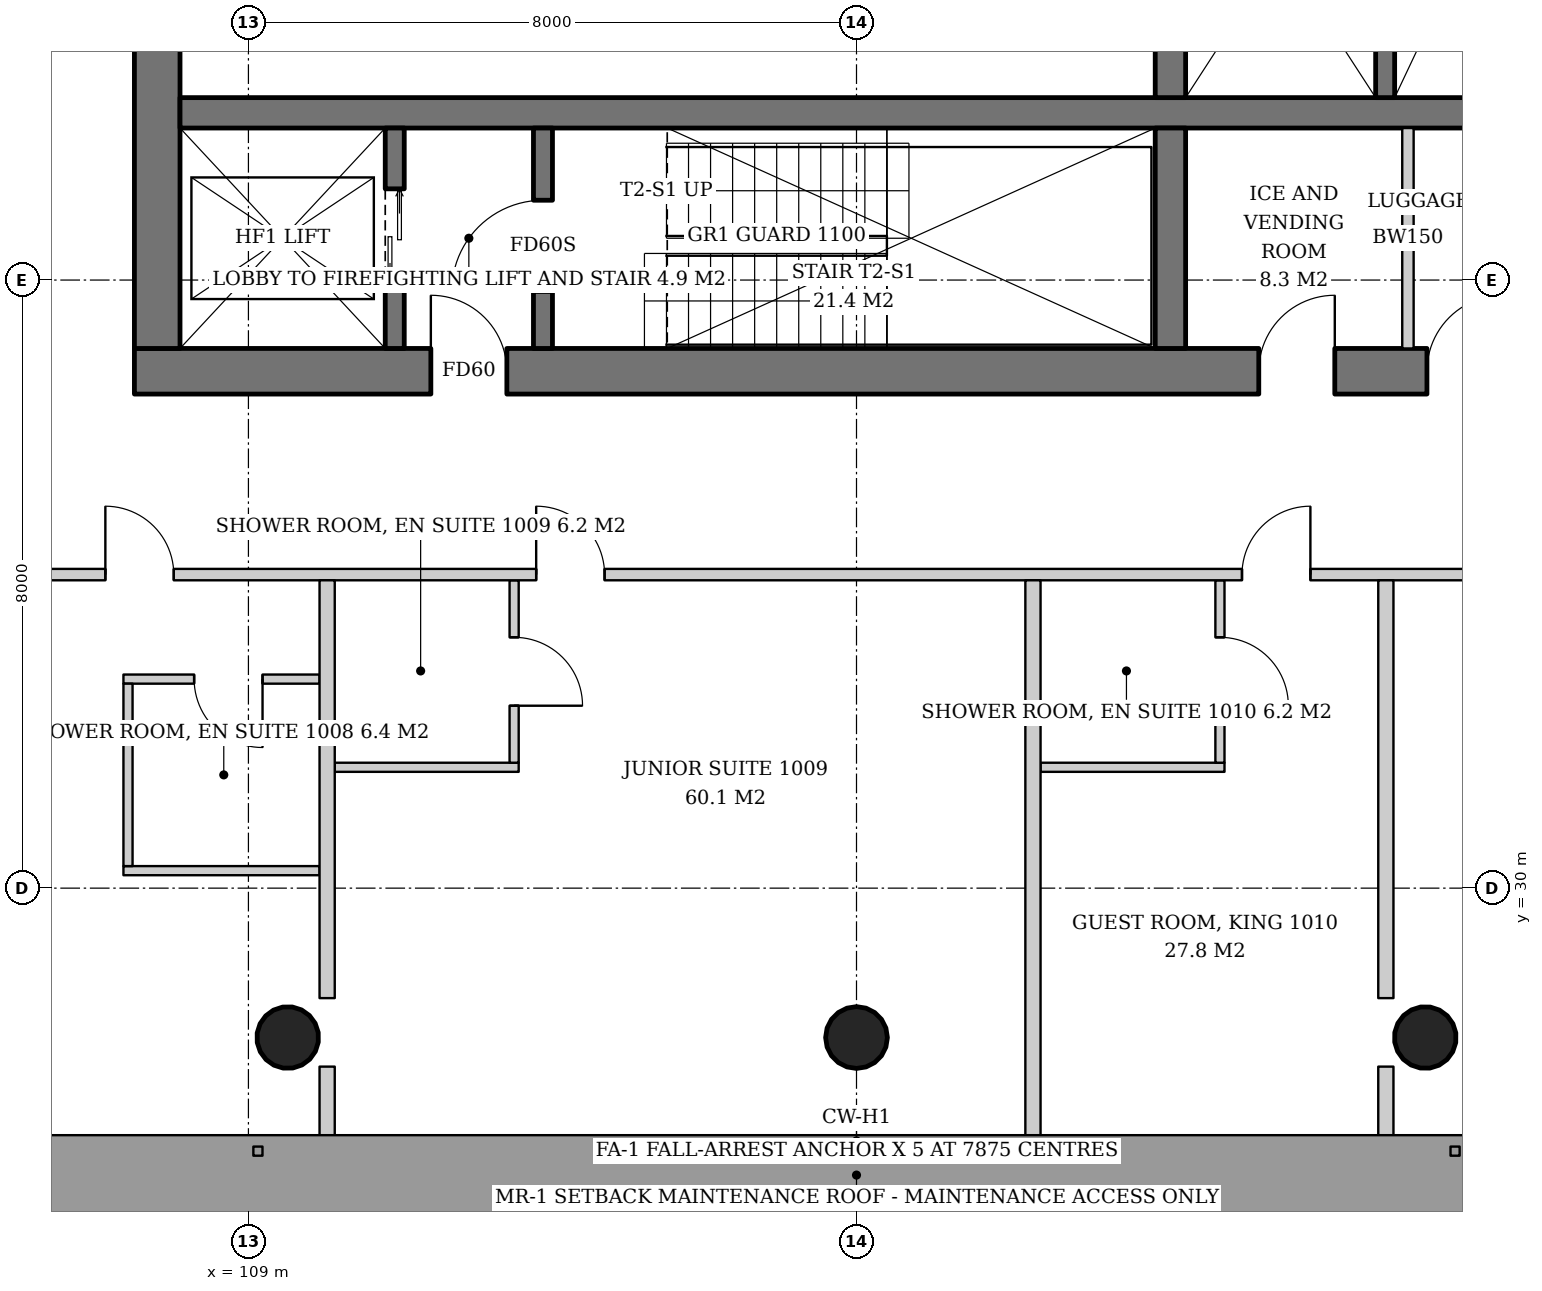
"""IFC4 building model, lengths in metres.
Left out: names, types, materials, properties, quantities, classifications, styles, units other than length and angle.
Written with IfcOpenShell. Run it as: python <this file> out.ifc"""

import sys

from ifc_helpers import new_model, si_unit, direction, frame, frame_2d, origin, origin_2d, place, context, subcontext, project, spatial, rectangle, hollow_circle, extrude, element, fill, save


model = new_model("IFC4")
c1 = context("Model", 3, precision=1e-05, world=origin(), true_north=direction((0.0, 1.0)))
c2 = subcontext(c1, "Body", "Model", "MODEL_VIEW")
j1 = project(units=[si_unit("LENGTHUNIT", "METRE"), si_unit("PLANEANGLEUNIT", "RADIAN")], contexts=[c1])
p1 = place(None, origin())
s1 = spatial("IfcSite", under=j1, at=p1, CompositionType="ELEMENT")
p2 = place(p1, origin())
s2 = spatial("IfcBuilding", under=s1, at=p2, CompositionType="ELEMENT")
p3 = place(p2, frame((0.0, 0.0, 43.8)))
s3 = spatial("IfcBuildingStorey", under=s2, at=p3, CompositionType="ELEMENT", Elevation=43.8)
p4 = place(p3, frame((109.491, 27.983, 0.0), z_axis=(0.021497706284, 0.043059584825, 0.998841188968), x_axis=(-0.894693706707, 0.446680166538, 0.0)))
e1 = element("IfcColumn", 1, at=p4, inside=s3, PredefinedType="COLUMN", context=c2, shape_type="SweptSolid", body=[
    extrude(hollow_circle(Radius=0.406, WallThickness=0.03, at=origin_2d()), origin(), (0.0, 0.0, 1.0), 3.804),
])
p5 = place(p3, frame((117.0, 27.983, 0.0), z_axis=(0.0, 0.043069538298, 0.999072076915), x_axis=(-1.0, 0.0, 0.0)))
e2 = element("IfcColumn", 2, at=p5, inside=s3, PredefinedType="COLUMN", context=c2, shape_type="SweptSolid", body=[
    extrude(hollow_circle(Radius=0.406, WallThickness=0.03, at=origin_2d()), origin(), (0.0, 0.0, 1.0), 3.803),
])
p6 = place(p3, frame((124.509, 27.983, 0.0), z_axis=(-0.021497706284, 0.043059584825, 0.998841188968), x_axis=(-0.894693706707, -0.446680166538, 0.0)))
e3 = element("IfcColumn", 3, at=p6, inside=s3, PredefinedType="COLUMN", context=c2, shape_type="SweptSolid", body=[
    extrude(hollow_circle(Radius=0.406, WallThickness=0.03, at=origin_2d()), origin(), (0.0, 0.0, 1.0), 3.804),
])
p7 = place(p3, frame((107.5, 36.8, 0.0), z_axis=(0.0, 0.0, 1.0), x_axis=(1.0, 0.0, 0.0)))
e4 = element("IfcWall", 4, at=p7, inside=s3, PredefinedType="SHEAR", context=c2, shape_type="SweptSolid", body=[
    extrude(rectangle(XDim=19.0, YDim=0.6, at=frame_2d((9.5, 0.0))), origin(), (0.0, 0.0, 1.0), 3.8),
])
p8 = place(p7, frame((3.9, 0.0, 0.0)))
e5 = element("IfcOpeningElement", 5, at=p8, cuts=e4, PredefinedType="OPENING", context=c2, shape_type="SweptSolid", body=[
    extrude(rectangle(XDim=1.0, YDim=2.1, at=frame_2d((0.5, 1.05))), frame((0.0, 0.31, 0.0), z_axis=(0.0, -1.0, 0.0), x_axis=(1.0, 0.0, 0.0)), (0.0, 0.0, 1.0), 0.62),
])
p9 = place(p7, frame((14.792, 0.0, 0.0)))
e6 = element("IfcOpeningElement", 6, at=p9, cuts=e4, PredefinedType="OPENING", context=c2, shape_type="SweptSolid", body=[
    extrude(rectangle(XDim=1.0, YDim=2.1, at=frame_2d((0.5, 1.05))), frame((0.0, 0.31, 0.0), z_axis=(0.0, -1.0, 0.0), x_axis=(1.0, 0.0, 0.0)), (0.0, 0.0, 1.0), 0.62),
])
p10 = place(p7, frame((17.005, 0.0, 0.0)))
e7 = element("IfcOpeningElement", 7, at=p10, cuts=e4, PredefinedType="OPENING", context=c2, shape_type="SweptSolid", body=[
    extrude(rectangle(XDim=1.0, YDim=2.1, at=frame_2d((0.5, 1.05))), frame((0.0, 0.31, 0.0), z_axis=(0.0, -1.0, 0.0), x_axis=(1.0, 0.0, 0.0)), (0.0, 0.0, 1.0), 0.62),
])
p11 = place(p3, frame((107.8, 37.1, 0.0), z_axis=(0.0, 0.0, 1.0), x_axis=(0.0, 1.0, 0.0)))
e8 = element("IfcWall", 8, at=p11, inside=s3, PredefinedType="SHEAR", context=c2, shape_type="SweptSolid", body=[
    extrude(rectangle(XDim=17.8, YDim=0.6, at=frame_2d((8.9, 0.0))), origin(), (0.0, 0.0, 1.0), 3.8),
])
p12 = place(p11, frame((8.0, 0.0, 0.0)))
e9 = element("IfcOpeningElement", 9, at=p12, cuts=e8, PredefinedType="OPENING", context=c2, shape_type="SweptSolid", body=[
    extrude(rectangle(XDim=1.8, YDim=2.4, at=frame_2d((0.9, 1.2))), frame((0.0, 0.31, 0.0), z_axis=(0.0, -1.0, 0.0), x_axis=(1.0, 0.0, 0.0)), (0.0, 0.0, 1.0), 0.62),
])
p13 = place(p3, frame((108.1, 40.2, 0.0), z_axis=(0.0, 0.0, 1.0), x_axis=(1.0, 0.0, 0.0)))
e10 = element("IfcWall", 10, at=p13, inside=s3, PredefinedType="SHEAR", context=c2, shape_type="SweptSolid", body=[
    extrude(rectangle(XDim=17.8, YDim=0.4, at=frame_2d((8.9, 0.0))), origin(), (0.0, 0.0, 1.0), 3.8),
])
p14 = place(p3, frame((121.13, 37.1, 0.0), z_axis=(0.0, 0.0, 1.0), x_axis=(0.0, 1.0, 0.0)))
e11 = element("IfcWall", 11, at=p14, inside=s3, PredefinedType="SHEAR", context=c2, shape_type="SweptSolid", body=[
    extrude(rectangle(XDim=2.9, YDim=0.4, at=frame_2d((1.45, 0.0))), origin(), (0.0, 0.0, 1.0), 3.8),
])
p15 = place(p3, frame((121.13, 40.4, 0.0), z_axis=(0.0, 0.0, 1.0), x_axis=(0.0, 1.0, 0.0)))
e12 = element("IfcWall", 12, at=p15, inside=s3, PredefinedType="SHEAR", context=c2, shape_type="SweptSolid", body=[
    extrude(rectangle(XDim=11.2, YDim=0.4, at=frame_2d((5.6, 0.0))), origin(), (0.0, 0.0, 1.0), 3.8),
])
p16 = place(p3, frame((110.925, 37.1, 0.0), z_axis=(0.0, 0.0, 1.0), x_axis=(0.0, 1.0, 0.0)))
e13 = element("IfcWall", 13, at=p16, inside=s3, PredefinedType="SHEAR", context=c2, shape_type="SweptSolid", body=[
    extrude(rectangle(XDim=2.9, YDim=0.25, at=frame_2d((1.45, 0.0))), origin(), (0.0, 0.0, 1.0), 3.8),
])
p17 = place(p16, frame((0.8, 0.0, 0.0)))
e14 = element("IfcOpeningElement", 14, at=p17, cuts=e13, PredefinedType="OPENING", context=c2, shape_type="SweptSolid", body=[
    extrude(rectangle(XDim=1.3, YDim=2.2, at=frame_2d((0.65, 1.1))), frame((0.0, 0.135, 0.0), z_axis=(0.0, -1.0, 0.0), x_axis=(1.0, 0.0, 0.0)), (0.0, 0.0, 1.0), 0.27),
])
p18 = place(p3, frame((112.875, 37.1, 0.0), z_axis=(0.0, 0.0, 1.0), x_axis=(0.0, 1.0, 0.0)))
e15 = element("IfcWall", 15, at=p18, inside=s3, PredefinedType="SHEAR", context=c2, shape_type="SweptSolid", body=[
    extrude(rectangle(XDim=2.9, YDim=0.25, at=frame_2d((1.45, 0.0))), origin(), (0.0, 0.0, 1.0), 3.8),
])
p19 = place(p18, frame((0.75, 0.0, 0.0)))
e16 = element("IfcOpeningElement", 16, at=p19, cuts=e15, PredefinedType="OPENING", context=c2, shape_type="SweptSolid", body=[
    extrude(rectangle(XDim=1.2, YDim=2.1, at=frame_2d((0.6, 1.05))), frame((0.0, 0.135, 0.0), z_axis=(0.0, -1.0, 0.0), x_axis=(1.0, 0.0, 0.0)), (0.0, 0.0, 1.0), 0.27),
])
p20 = place(p3, frame((123.955, 44.25, 0.0), z_axis=(0.0, 0.0, 1.0), x_axis=(0.0, -1.0, 0.0)))
e17 = element("IfcWall", 17, at=p20, inside=s3, PredefinedType="SHEAR", context=c2, shape_type="SweptSolid", body=[
    extrude(rectangle(XDim=3.85, YDim=0.25, at=frame_2d((1.925, 0.0))), origin(), (0.0, 0.0, 1.0), 3.8),
])
p21 = place(p3, frame((124.255, 37.1, 0.0), z_axis=(0.0, 0.0, 1.0), x_axis=(0.0, 1.0, 0.0)))
e18 = element("IfcWall", 18, at=p21, inside=s3, PredefinedType="SOLIDWALL", context=c2, shape_type="SweptSolid", body=[
    extrude(rectangle(XDim=2.9, YDim=0.15, at=frame_2d((1.45, 0.0))), origin(), (0.0, 0.0, 1.0), 3.6),
])
p22 = place(p3, frame((109.936, 32.75, 0.0), z_axis=(0.0, 0.0, 1.0), x_axis=(-1.0, 0.0, 0.0)))
e19 = element("IfcWall", 19, at=p22, inside=s3, PredefinedType="PARTITIONING", context=c2, shape_type="SweptSolid", body=[
    extrude(rectangle(XDim=2.58, YDim=0.12, at=frame_2d((1.29, 0.0))), origin(), (0.0, 0.0, 1.0), 2.8),
])
p23 = place(p22, frame((0.75, 0.0, 0.0)))
e20 = element("IfcOpeningElement", 20, at=p23, cuts=e19, PredefinedType="OPENING", context=c2, shape_type="SweptSolid", body=[
    extrude(rectangle(XDim=0.9, YDim=2.1, at=frame_2d((0.45, 1.05))), frame((0.0, 0.07, 0.0), z_axis=(0.0, -1.0, 0.0), x_axis=(1.0, 0.0, 0.0)), (0.0, 0.0, 1.0), 0.14),
])
p24 = place(p3, frame((109.936, 30.23, 0.0), z_axis=(0.0, 0.0, 1.0), x_axis=(-1.0, 0.0, 0.0)))
e21 = element("IfcWall", 21, at=p24, inside=s3, PredefinedType="PARTITIONING", context=c2, shape_type="SweptSolid", body=[
    extrude(rectangle(XDim=2.58, YDim=0.12, at=frame_2d((1.29, 0.0))), origin(), (0.0, 0.0, 1.0), 2.8),
])
p25 = place(p3, frame((107.416, 32.69, 0.0), z_axis=(0.0, 0.0, 1.0), x_axis=(0.0, -1.0, 0.0)))
e22 = element("IfcWall", 22, at=p25, inside=s3, PredefinedType="PARTITIONING", context=c2, shape_type="SweptSolid", body=[
    extrude(rectangle(XDim=2.4, YDim=0.12, at=frame_2d((1.2, 0.0))), origin(), (0.0, 0.0, 1.0), 2.847),
])
p26 = place(p3, frame((110.136, 31.59, 0.0), z_axis=(0.0, 0.0, 1.0), x_axis=(1.0, 0.0, 0.0)))
e23 = element("IfcWall", 23, at=p26, inside=s3, PredefinedType="PARTITIONING", context=c2, shape_type="SweptSolid", body=[
    extrude(rectangle(XDim=2.42, YDim=0.12, at=frame_2d((1.21, 0.0))), origin(), (0.0, 0.0, 1.0), 2.847),
])
p27 = place(p3, frame((112.496, 34.05, 0.0), z_axis=(0.0, 0.0, 1.0), x_axis=(0.0, -1.0, 0.0)))
e24 = element("IfcWall", 24, at=p27, inside=s3, PredefinedType="PARTITIONING", context=c2, shape_type="SweptSolid", body=[
    extrude(rectangle(XDim=2.4, YDim=0.12, at=frame_2d((1.2, 0.0))), origin(), (0.0, 0.0, 1.0), 2.847),
])
p28 = place(p27, frame((0.75, 0.0, 0.0)))
e25 = element("IfcOpeningElement", 25, at=p28, cuts=e24, PredefinedType="OPENING", context=c2, shape_type="SweptSolid", body=[
    extrude(rectangle(XDim=0.9, YDim=2.1, at=frame_2d((0.45, 1.05))), frame((0.0, 0.07, 0.0), z_axis=(0.0, -1.0, 0.0), x_axis=(1.0, 0.0, 0.0)), (0.0, 0.0, 1.0), 0.14),
])
p29 = place(p3, frame((119.421, 31.59, 0.0), z_axis=(0.0, 0.0, 1.0), x_axis=(1.0, 0.0, 0.0)))
e26 = element("IfcWall", 26, at=p29, inside=s3, PredefinedType="PARTITIONING", context=c2, shape_type="SweptSolid", body=[
    extrude(rectangle(XDim=2.42, YDim=0.12, at=frame_2d((1.21, 0.0))), origin(), (0.0, 0.0, 1.0), 2.847),
])
p30 = place(p3, frame((121.781, 34.05, 0.0), z_axis=(0.0, 0.0, 1.0), x_axis=(0.0, -1.0, 0.0)))
e27 = element("IfcWall", 27, at=p30, inside=s3, PredefinedType="PARTITIONING", context=c2, shape_type="SweptSolid", body=[
    extrude(rectangle(XDim=2.4, YDim=0.12, at=frame_2d((1.2, 0.0))), origin(), (0.0, 0.0, 1.0), 3.6),
])
p31 = place(p30, frame((0.75, 0.0, 0.0)))
e28 = element("IfcOpeningElement", 28, at=p31, cuts=e27, PredefinedType="OPENING", context=c2, shape_type="SweptSolid", body=[
    extrude(rectangle(XDim=0.9, YDim=2.1, at=frame_2d((0.45, 1.05))), frame((0.0, 0.07, 0.0), z_axis=(0.0, -1.0, 0.0), x_axis=(1.0, 0.0, 0.0)), (0.0, 0.0, 1.0), 0.14),
])
p32 = place(p3, frame((105.05, 34.125, 0.0), z_axis=(0.0, 0.0, 1.0), x_axis=(1.0, 0.0, 0.0)))
e29 = element("IfcWall", 29, at=p32, inside=s3, PredefinedType="PARTITIONING", context=c2, shape_type="SweptSolid", body=[
    extrude(rectangle(XDim=23.75, YDim=0.15, at=frame_2d((11.875, 0.0))), origin(), (0.0, 0.0, 1.0), 2.8),
])
p33 = place(p32, frame((2.068, 0.0, 0.0)))
e30 = element("IfcOpeningElement", 30, at=p33, cuts=e29, PredefinedType="OPENING", context=c2, shape_type="SweptSolid", body=[
    extrude(rectangle(XDim=0.9, YDim=2.1, at=frame_2d((0.45, 1.05))), frame((0.0, 0.085, 0.0), z_axis=(0.0, -1.0, 0.0), x_axis=(1.0, 0.0, 0.0)), (0.0, 0.0, 1.0), 0.17),
])
p34 = place(p32, frame((7.736, 0.0, 0.0)))
e31 = element("IfcOpeningElement", 31, at=p34, cuts=e29, PredefinedType="OPENING", context=c2, shape_type="SweptSolid", body=[
    extrude(rectangle(XDim=0.9, YDim=2.1, at=frame_2d((0.45, 1.05))), frame((0.0, 0.085, 0.0), z_axis=(0.0, -1.0, 0.0), x_axis=(1.0, 0.0, 0.0)), (0.0, 0.0, 1.0), 0.17),
])
p35 = place(p32, frame((17.021, 0.0, 0.0)))
e32 = element("IfcOpeningElement", 32, at=p35, cuts=e29, PredefinedType="OPENING", context=c2, shape_type="SweptSolid", body=[
    extrude(rectangle(XDim=0.9, YDim=2.1, at=frame_2d((0.45, 1.05))), frame((0.0, 0.085, 0.0), z_axis=(0.0, -1.0, 0.0), x_axis=(1.0, 0.0, 0.0)), (0.0, 0.0, 1.0), 0.17),
])
p36 = place(p3, frame((110.036, 34.05, 0.0), z_axis=(0.0, 0.0, 1.0), x_axis=(0.0, -1.0, 0.0)))
e33 = element("IfcWall", 33, at=p36, inside=s3, PredefinedType="PARTITIONING", context=c2, shape_type="SweptSolid", body=[
    extrude(rectangle(XDim=5.497, YDim=0.2, at=frame_2d((2.749, 0.0))), origin(), (0.0, 0.0, 1.0), 3.6),
])
p37 = place(p3, frame((110.036, 27.652, 0.0), z_axis=(0.0, 0.0, 1.0), x_axis=(0.0, -1.0, 0.0)))
e34 = element("IfcWall", 34, at=p37, inside=s3, PredefinedType="PARTITIONING", context=c2, shape_type="SweptSolid", body=[
    extrude(rectangle(XDim=0.942, YDim=0.2, at=frame_2d((0.471, 0.0))), origin(), (0.0, 0.0, 1.0), 3.6),
])
p38 = place(p3, frame((119.322, 34.05, 0.0), z_axis=(0.0, 0.0, 1.0), x_axis=(0.0, -1.0, 0.0)))
e35 = element("IfcWall", 35, at=p38, inside=s3, PredefinedType="PARTITIONING", context=c2, shape_type="SweptSolid", body=[
    extrude(rectangle(XDim=7.34, YDim=0.2, at=frame_2d((3.67, 0.0))), origin(), (0.0, 0.0, 1.0), 3.05),
])
p39 = place(p3, frame((123.964, 34.05, 0.0), z_axis=(0.0, 0.0, 1.0), x_axis=(0.0, -1.0, 0.0)))
e36 = element("IfcWall", 36, at=p39, inside=s3, PredefinedType="PARTITIONING", context=c2, shape_type="SweptSolid", body=[
    extrude(rectangle(XDim=5.497, YDim=0.2, at=frame_2d((2.749, 0.0))), origin(), (0.0, 0.0, 1.0), 3.6),
])
p40 = place(p3, frame((123.964, 27.652, 0.0), z_axis=(0.0, 0.0, 1.0), x_axis=(0.0, -1.0, 0.0)))
e37 = element("IfcWall", 37, at=p40, inside=s3, PredefinedType="PARTITIONING", context=c2, shape_type="SweptSolid", body=[
    extrude(rectangle(XDim=0.942, YDim=0.2, at=frame_2d((0.471, 0.0))), origin(), (0.0, 0.0, 1.0), 3.6),
])
p41 = place(p17, origin())
e38 = element("IfcDoor", 38, at=p41, inside=s3, OperationType="DOUBLE_DOOR_SLIDING", PredefinedType="DOOR", context=c2, shape_type="SweptSolid", body=[
    extrude(rectangle(XDim=1.3, YDim=2.2, at=frame_2d((0.65, 1.1))), frame((0.0, 0.025, 0.0), z_axis=(0.0, -1.0, 0.0), x_axis=(1.0, 0.0, 0.0)), (0.0, 0.0, 1.0), 0.05),
])
fill(e14, e38)
p42 = place(p19, origin())
e39 = element("IfcDoor", 39, at=p42, inside=s3, OperationType="SINGLE_SWING_LEFT", PredefinedType="DOOR", context=c2, shape_type="SweptSolid", body=[
    extrude(rectangle(XDim=1.2, YDim=2.1, at=frame_2d((0.6, 1.05))), frame((0.0, 0.025, 0.0), z_axis=(0.0, -1.0, 0.0), x_axis=(1.0, 0.0, 0.0)), (0.0, 0.0, 1.0), 0.05),
])
fill(e16, e39)
p43 = place(p8, origin())
e40 = element("IfcDoor", 40, at=p43, inside=s3, OperationType="SINGLE_SWING_LEFT", PredefinedType="DOOR", context=c2, shape_type="SweptSolid", body=[
    extrude(rectangle(XDim=1.0, YDim=2.1, at=frame_2d((0.5, 1.05))), frame((0.0, 0.025, 0.0), z_axis=(0.0, -1.0, 0.0), x_axis=(1.0, 0.0, 0.0)), (0.0, 0.0, 1.0), 0.05),
])
fill(e5, e40)
p44 = place(p9, origin())
e41 = element("IfcDoor", 41, at=p44, inside=s3, OperationType="SINGLE_SWING_RIGHT", PredefinedType="DOOR", context=c2, shape_type="SweptSolid", body=[
    extrude(rectangle(XDim=1.0, YDim=2.1, at=frame_2d((0.5, 1.05))), frame((0.0, 0.29, 0.0), z_axis=(0.0, -1.0, 0.0), x_axis=(1.0, 0.0, 0.0)), (0.0, 0.0, 1.0), 0.05),
])
fill(e6, e41)
p45 = place(p10, origin())
e42 = element("IfcDoor", 42, at=p45, inside=s3, OperationType="SINGLE_SWING_RIGHT", PredefinedType="DOOR", context=c2, shape_type="SweptSolid", body=[
    extrude(rectangle(XDim=1.0, YDim=2.1, at=frame_2d((0.5, 1.05))), frame((0.0, 0.29, 0.0), z_axis=(0.0, -1.0, 0.0), x_axis=(1.0, 0.0, 0.0)), (0.0, 0.0, 1.0), 0.05),
])
fill(e7, e42)
p46 = place(p23, origin())
e43 = element("IfcDoor", 43, at=p46, inside=s3, OperationType="SINGLE_SWING_LEFT", PredefinedType="DOOR", context=c2, shape_type="SweptSolid", body=[
    extrude(rectangle(XDim=0.9, YDim=2.1, at=frame_2d((0.45, 1.05))), frame((0.0, 0.025, 0.0), z_axis=(0.0, -1.0, 0.0), x_axis=(1.0, 0.0, 0.0)), (0.0, 0.0, 1.0), 0.05),
])
fill(e20, e43)
p47 = place(p28, origin())
e44 = element("IfcDoor", 44, at=p47, inside=s3, OperationType="SINGLE_SWING_RIGHT", PredefinedType="DOOR", context=c2, shape_type="SweptSolid", body=[
    extrude(rectangle(XDim=0.9, YDim=2.1, at=frame_2d((0.45, 1.05))), frame((0.0, 0.025, 0.0), z_axis=(0.0, -1.0, 0.0), x_axis=(1.0, 0.0, 0.0)), (0.0, 0.0, 1.0), 0.05),
])
fill(e25, e44)
p48 = place(p31, origin())
e45 = element("IfcDoor", 45, at=p48, inside=s3, OperationType="SINGLE_SWING_RIGHT", PredefinedType="DOOR", context=c2, shape_type="SweptSolid", body=[
    extrude(rectangle(XDim=0.9, YDim=2.1, at=frame_2d((0.45, 1.05))), frame((0.0, 0.025, 0.0), z_axis=(0.0, -1.0, 0.0), x_axis=(1.0, 0.0, 0.0)), (0.0, 0.0, 1.0), 0.05),
])
fill(e28, e45)
p49 = place(p33, origin())
e46 = element("IfcDoor", 46, at=p49, inside=s3, OperationType="SINGLE_SWING_LEFT", PredefinedType="DOOR", context=c2, shape_type="SweptSolid", body=[
    extrude(rectangle(XDim=0.9, YDim=2.1, at=frame_2d((0.45, 1.05))), frame((0.0, 0.025, 0.0), z_axis=(0.0, -1.0, 0.0), x_axis=(1.0, 0.0, 0.0)), (0.0, 0.0, 1.0), 0.05),
])
fill(e30, e46)
p50 = place(p34, origin())
e47 = element("IfcDoor", 47, at=p50, inside=s3, OperationType="SINGLE_SWING_LEFT", PredefinedType="DOOR", context=c2, shape_type="SweptSolid", body=[
    extrude(rectangle(XDim=0.9, YDim=2.1, at=frame_2d((0.45, 1.05))), frame((0.0, 0.025, 0.0), z_axis=(0.0, -1.0, 0.0), x_axis=(1.0, 0.0, 0.0)), (0.0, 0.0, 1.0), 0.05),
])
fill(e31, e47)
p51 = place(p35, origin())
e48 = element("IfcDoor", 48, at=p51, inside=s3, OperationType="SINGLE_SWING_RIGHT", PredefinedType="DOOR", context=c2, shape_type="SweptSolid", body=[
    extrude(rectangle(XDim=0.9, YDim=2.1, at=frame_2d((0.45, 1.05))), frame((0.0, 0.025, 0.0), z_axis=(0.0, -1.0, 0.0), x_axis=(1.0, 0.0, 0.0)), (0.0, 0.0, 1.0), 0.05),
])
fill(e32, e48)
save(model, sys.argv[1])
